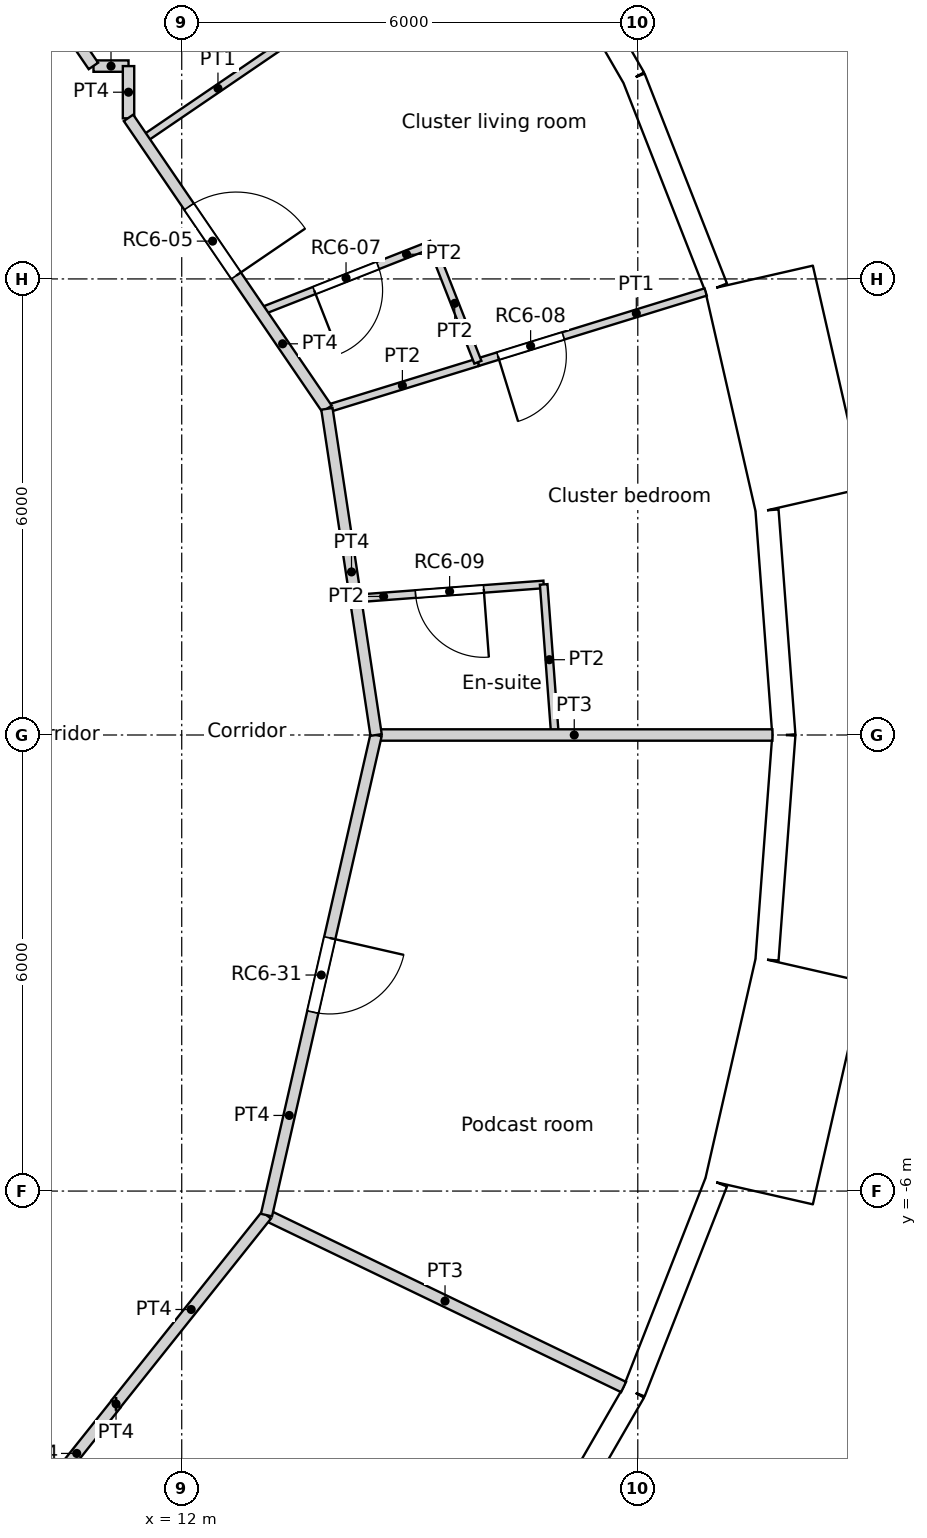
"""IFC4 building model, lengths in metres.
Left out: names, types, materials, properties, quantities, classifications, styles, units other than length and angle.
Written with IfcOpenShell. Run it as: python <this file> out.ifc"""

import sys

from ifc_helpers import new_model, si_unit, direction, frame, frame_2d, origin, origin_2d, place, context, subcontext, project, spatial, rectangle, circle, extrude, element, fill, save


model = new_model("IFC4")
c1 = context("Model", 3, precision=1e-05, world=origin(), true_north=direction((0.0, 1.0)))
c2 = subcontext(c1, "Body", "Model", "MODEL_VIEW")
j1 = project(units=[si_unit("LENGTHUNIT", "METRE"), si_unit("PLANEANGLEUNIT", "RADIAN")], contexts=[c1])
p1 = place(None, origin())
s1 = spatial("IfcSite", under=j1, at=p1, CompositionType="ELEMENT")
p2 = place(p1, origin())
s2 = spatial("IfcBuilding", under=s1, at=p2, CompositionType="ELEMENT")
p3 = place(p2, frame((0.0, 0.0, 283.8)))
s3 = spatial("IfcBuildingStorey", under=s2, at=p3, CompositionType="ELEMENT", Elevation=283.8)
for number, where, z_axis, x_axis in (
    (1, (18.822, 0.0, 0.0), (0.0, 0.0, 1.0), (1.0, 0.0, 0.0)),
    (2, (17.986, 5.548, 0.0), (0.0, 0.0, 1.0), (1.0, 0.0, 0.0)),
    (3, (17.986, -5.548, 0.0), (0.0, 0.0, 1.0), (1.0, 0.0, 0.0)),
):
    element("IfcColumn", number, at=place(p3, frame(where, z_axis=z_axis, x_axis=x_axis)), inside=s3, PredefinedType="COLUMN", context=c2, shape_type="SweptSolid", body=[
        extrude(circle(Radius=0.45, at=origin_2d()), origin(), (0.0, 0.0, 1.0), 3.6),
    ])
p4 = place(p3, frame((19.922, 0.0, 0.0), z_axis=(0.0, 0.0, 1.0), x_axis=(-0.074755115547, 0.997201921729, 0.0)))
e4 = element("IfcWall", 4, at=p4, inside=s3, PredefinedType="SOLIDWALL", context=c2, shape_type="SweptSolid", body=[
    extrude(rectangle(XDim=2.962, YDim=0.3, at=frame_2d((1.481, 0.0))), origin(), (0.0, 0.0, 1.0), 3.25),
])
p5 = place(p4, frame((1.481, 0.0, 1.55)))
e5 = element("IfcOpeningElement", 5, at=p5, cuts=e4, PredefinedType="OPENING", context=c2, shape_type="SweptSolid", body=[
    extrude(circle(Radius=0.9, at=origin_2d()), frame((0.0, 0.16, 0.0), z_axis=(0.0, -1.0, 0.0), x_axis=(1.0, 0.0, 0.0)), (0.0, 0.0, 1.0), 0.32),
])
p6 = place(p3, frame((20.262, 3.086, -0.35), z_axis=(0.0, 0.0, 1.0), x_axis=(-0.222570682856, 0.974916555985, 0.0)))
e6 = element("IfcWall", 6, at=p6, inside=s3, PredefinedType="ELEMENTEDWALL", context=c2, shape_type="SweptSolid", body=[
    extrude(rectangle(XDim=3.0, YDim=1.45, at=frame_2d((1.5, 0.0))), origin(), (0.0, 0.0, 1.0), 3.6),
])
p7 = place(p6, frame((1.5, 0.0, 1.9)))
e7 = element("IfcOpeningElement", 7, at=p7, cuts=e6, PredefinedType="OPENING", context=c2, shape_type="SweptSolid", body=[
    extrude(circle(Radius=0.9, at=origin_2d()), frame((0.0, 0.735, 0.0), z_axis=(0.0, -1.0, 0.0), x_axis=(1.0, 0.0, 0.0)), (0.0, 0.0, 1.0), 1.47),
])
p8 = place(p3, frame((19.031, 5.886, 0.0), z_axis=(0.0, 0.0, 1.0), x_axis=(-0.365343821297, 0.930872650925, 0.0)))
e8 = element("IfcWall", 8, at=p8, inside=s3, PredefinedType="SOLIDWALL", context=c2, shape_type="SweptSolid", body=[
    extrude(rectangle(XDim=2.962, YDim=0.3, at=frame_2d((1.481, 0.0))), origin(), (0.0, 0.0, 1.0), 3.25),
])
p9 = place(p8, frame((1.481, 0.0, 1.55)))
e9 = element("IfcOpeningElement", 9, at=p9, cuts=e8, PredefinedType="OPENING", context=c2, shape_type="SweptSolid", body=[
    extrude(circle(Radius=0.9, at=origin_2d()), frame((0.0, 0.16, 0.0), z_axis=(0.0, -1.0, 0.0), x_axis=(1.0, 0.0, 0.0)), (0.0, 0.0, 1.0), 0.32),
])
p10 = place(p3, frame((17.949, 8.644, 0.0), z_axis=(0.0, 0.0, 1.0), x_axis=(-0.500012570604, 0.866018146021, 0.0)))
e10 = element("IfcWall", 10, at=p10, inside=s3, PredefinedType="SOLIDWALL", context=c2, shape_type="SweptSolid", body=[
    extrude(rectangle(XDim=2.962, YDim=0.3, at=frame_2d((1.481, 0.0))), origin(), (0.0, 0.0, 1.0), 3.25),
])
p11 = place(p10, frame((1.481, 0.0, 1.55)))
e11 = element("IfcOpeningElement", 11, at=p11, cuts=e10, PredefinedType="OPENING", context=c2, shape_type="SweptSolid", body=[
    extrude(circle(Radius=0.9, at=origin_2d()), frame((0.0, 0.16, 0.0), z_axis=(0.0, -1.0, 0.0), x_axis=(1.0, 0.0, 0.0)), (0.0, 0.0, 1.0), 0.32),
])
p12 = place(p3, frame((16.468, -11.209, 0.0), z_axis=(0.0, 0.0, 1.0), x_axis=(0.500012570604, 0.866018146021, 0.0)))
e12 = element("IfcWall", 12, at=p12, inside=s3, PredefinedType="SOLIDWALL", context=c2, shape_type="SweptSolid", body=[
    extrude(rectangle(XDim=2.962, YDim=0.3, at=frame_2d((1.481, 0.0))), origin(), (0.0, 0.0, 1.0), 3.25),
])
p13 = place(p12, frame((1.481, 0.0, 1.55)))
e13 = element("IfcOpeningElement", 13, at=p13, cuts=e12, PredefinedType="OPENING", context=c2, shape_type="SweptSolid", body=[
    extrude(circle(Radius=0.9, at=origin_2d()), frame((0.0, 0.16, 0.0), z_axis=(0.0, -1.0, 0.0), x_axis=(1.0, 0.0, 0.0)), (0.0, 0.0, 1.0), 0.32),
])
p14 = place(p3, frame((17.949, -8.644, 0.0), z_axis=(0.0, 0.0, 1.0), x_axis=(0.365343821297, 0.930872650925, 0.0)))
e14 = element("IfcWall", 14, at=p14, inside=s3, PredefinedType="SOLIDWALL", context=c2, shape_type="SweptSolid", body=[
    extrude(rectangle(XDim=2.962, YDim=0.3, at=frame_2d((1.481, 0.0))), origin(), (0.0, 0.0, 1.0), 3.25),
])
p15 = place(p14, frame((1.481, 0.0, 1.55)))
e15 = element("IfcOpeningElement", 15, at=p15, cuts=e14, PredefinedType="OPENING", context=c2, shape_type="SweptSolid", body=[
    extrude(circle(Radius=0.9, at=origin_2d()), frame((0.0, 0.16, 0.0), z_axis=(0.0, -1.0, 0.0), x_axis=(1.0, 0.0, 0.0)), (0.0, 0.0, 1.0), 0.32),
])
p16 = place(p3, frame((19.595, -6.011, -0.35), z_axis=(0.0, 0.0, 1.0), x_axis=(0.222570682856, 0.974916555985, 0.0)))
e16 = element("IfcWall", 16, at=p16, inside=s3, PredefinedType="ELEMENTEDWALL", context=c2, shape_type="SweptSolid", body=[
    extrude(rectangle(XDim=3.0, YDim=1.45, at=frame_2d((1.5, 0.0))), origin(), (0.0, 0.0, 1.0), 3.6),
])
p17 = place(p16, frame((1.5, 0.0, 1.9)))
e17 = element("IfcOpeningElement", 17, at=p17, cuts=e16, PredefinedType="OPENING", context=c2, shape_type="SweptSolid", body=[
    extrude(circle(Radius=0.9, at=origin_2d()), frame((0.0, 0.735, 0.0), z_axis=(0.0, -1.0, 0.0), x_axis=(1.0, 0.0, 0.0)), (0.0, 0.0, 1.0), 1.47),
])
p18 = place(p3, frame((19.7, -2.954, 0.0), z_axis=(0.0, 0.0, 1.0), x_axis=(0.074755115547, 0.997201921729, 0.0)))
e18 = element("IfcWall", 18, at=p18, inside=s3, PredefinedType="SOLIDWALL", context=c2, shape_type="SweptSolid", body=[
    extrude(rectangle(XDim=2.962, YDim=0.3, at=frame_2d((1.481, 0.0))), origin(), (0.0, 0.0, 1.0), 3.25),
])
p19 = place(p18, frame((1.481, 0.0, 1.55)))
e19 = element("IfcOpeningElement", 19, at=p19, cuts=e18, PredefinedType="OPENING", context=c2, shape_type="SweptSolid", body=[
    extrude(circle(Radius=0.9, at=origin_2d()), frame((0.0, 0.16, 0.0), z_axis=(0.0, -1.0, 0.0), x_axis=(1.0, 0.0, 0.0)), (0.0, 0.0, 1.0), 0.32),
])
p20 = place(p3, frame((9.075, 11.381, 0.0), z_axis=(0.0, 0.0, 1.0), x_axis=(0.564277533473, -0.825585165333, 0.0)))
e20 = element("IfcWall", 20, at=p20, inside=s3, PredefinedType="PARTITIONING", context=c2, shape_type="SweptSolid", body=[
    extrude(rectangle(XDim=3.123, YDim=0.15, at=frame_2d((1.562, 0.0))), origin(), (0.0, 0.0, 1.0), 3.25),
])
p21 = place(p3, frame((10.839, 8.8, 0.0), z_axis=(0.0, 0.0, 1.0), x_axis=(1.0, 0.0, 0.0)))
e21 = element("IfcWall", 21, at=p21, inside=s3, PredefinedType="PARTITIONING", context=c2, shape_type="SweptSolid", body=[
    extrude(rectangle(XDim=0.461, YDim=0.15, at=frame_2d((0.23, 0.0))), origin(), (0.0, 0.0, 1.0), 3.25),
])
p22 = place(p3, frame((11.3, 8.113, 0.0), z_axis=(0.0, 0.0, 1.0), x_axis=(0.0, 1.0, 0.0)))
e22 = element("IfcWall", 22, at=p22, inside=s3, PredefinedType="PARTITIONING", context=c2, shape_type="SweptSolid", body=[
    extrude(rectangle(XDim=0.687, YDim=0.15, at=frame_2d((0.344, 0.0))), origin(), (0.0, 0.0, 1.0), 3.25),
])
p23 = place(p3, frame((11.137, -8.8, 0.0), z_axis=(0.0, 0.0, 1.0), x_axis=(-1.0, 0.0, 0.0)))
e23 = element("IfcWall", 23, at=p23, inside=s3, PredefinedType="PARTITIONING", context=c2, shape_type="SweptSolid", body=[
    extrude(rectangle(XDim=0.003, YDim=0.15, at=frame_2d((0.001, 0.0))), origin(), (0.0, 0.0, 1.0), 3.25),
])
p24 = place(p3, frame((10.101, -10.101, 0.0), z_axis=(0.0, 0.0, 1.0), x_axis=(0.623098344652, 0.782143498913, 0.0)))
e24 = element("IfcWall", 24, at=p24, inside=s3, PredefinedType="PARTITIONING", context=c2, shape_type="SweptSolid", body=[
    extrude(rectangle(XDim=1.661, YDim=0.15, at=frame_2d((0.831, 0.0))), origin(), (0.0, 0.0, 1.0), 3.25),
])
p25 = place(p3, frame((11.3, 8.119, 0.0), z_axis=(0.0, 0.0, 1.0), x_axis=(0.56348561488, -0.82612587529, 0.0)))
e25 = element("IfcWall", 25, at=p25, inside=s3, PredefinedType="PARTITIONING", context=c2, shape_type="SweptSolid", body=[
    extrude(rectangle(XDim=4.633, YDim=0.15, at=frame_2d((2.316, 0.0))), origin(), (0.0, 0.0, 1.0), 3.25),
])
p26 = place(p25, frame((1.413, 0.0, 0.0)))
e26 = element("IfcOpeningElement", 26, at=p26, cuts=e25, PredefinedType="OPENING", context=c2, shape_type="SweptSolid", body=[
    extrude(rectangle(XDim=1.1, YDim=2.1, at=frame_2d((0.55, 1.05))), frame((0.0, 0.075, 0.0), z_axis=(0.0, -1.0, 0.0), x_axis=(1.0, 0.0, 0.0)), (0.0, 0.0, 1.0), 0.15),
])
p27 = place(p3, frame((13.91, 4.291, 0.0), z_axis=(0.0, 0.0, 1.0), x_axis=(0.149143716951, -0.988815529659, 0.0)))
e27 = element("IfcWall", 27, at=p27, inside=s3, PredefinedType="PARTITIONING", context=c2, shape_type="SweptSolid", body=[
    extrude(rectangle(XDim=4.34, YDim=0.15, at=frame_2d((2.17, 0.0))), origin(), (0.0, 0.0, 1.0), 3.25),
])
p28 = place(p3, frame((11.134, -8.8, 0.0), z_axis=(0.0, 0.0, 1.0), x_axis=(0.623476099415, 0.781842409606, 0.0)))
e28 = element("IfcWall", 28, at=p28, inside=s3, PredefinedType="PARTITIONING", context=c2, shape_type="SweptSolid", body=[
    extrude(rectangle(XDim=3.177, YDim=0.15, at=frame_2d((1.589, 0.0))), origin(), (0.0, 0.0, 1.0), 3.25),
])
p29 = place(p3, frame((13.115, -6.316, 0.0), z_axis=(0.0, 0.0, 1.0), x_axis=(0.222568978642, 0.97491694505, 0.0)))
e29 = element("IfcWall", 29, at=p29, inside=s3, PredefinedType="PARTITIONING", context=c2, shape_type="SweptSolid", body=[
    extrude(rectangle(XDim=6.479, YDim=0.15, at=frame_2d((3.239, 0.0))), origin(), (0.0, 0.0, 1.0), 3.25),
])
p30 = place(p29, frame((2.74, 0.0, 0.0)))
e30 = element("IfcOpeningElement", 30, at=p30, cuts=e29, PredefinedType="OPENING", context=c2, shape_type="SweptSolid", body=[
    extrude(rectangle(XDim=1.0, YDim=2.04, at=frame_2d((0.5, 1.02))), frame((0.0, 0.075, 0.0), z_axis=(0.0, -1.0, 0.0), x_axis=(1.0, 0.0, 0.0)), (0.0, 0.0, 1.0), 0.15),
])
p31 = place(p3, frame((11.493, 7.836, 0.0), z_axis=(0.0, 0.0, 1.0), x_axis=(0.826231748746, 0.563330362544, 0.0)))
e31 = element("IfcWall", 31, at=p31, inside=s3, PredefinedType="PARTITIONING", context=c2, shape_type="SweptSolid", body=[
    extrude(rectangle(XDim=5.862, YDim=0.1, at=frame_2d((2.931, 0.0))), origin(), (0.0, 0.0, 1.0), 3.25),
])
p32 = place(p31, frame((2.431, 0.0, 0.0)))
e32 = element("IfcOpeningElement", 32, at=p32, cuts=e31, PredefinedType="OPENING", context=c2, shape_type="SweptSolid", body=[
    extrude(rectangle(XDim=1.0, YDim=2.04, at=frame_2d((0.5, 1.02))), frame((0.0, 0.05, 0.0), z_axis=(0.0, -1.0, 0.0), x_axis=(1.0, 0.0, 0.0)), (0.0, 0.0, 1.0), 0.1),
])
p33 = place(p3, frame((15.287, 6.454, 0.0), z_axis=(0.0, 0.0, 1.0), x_axis=(0.365620622357, -0.930763966056, 0.0)))
e33 = element("IfcWall", 33, at=p33, inside=s3, PredefinedType="PARTITIONING", context=c2, shape_type="SweptSolid", body=[
    extrude(rectangle(XDim=1.665, YDim=0.1, at=frame_2d((0.833, 0.0))), origin(), (0.0, 0.0, 1.0), 3.25),
])
p34 = place(p3, frame((13.037, 5.571, 0.0), z_axis=(0.0, 0.0, 1.0), x_axis=(0.930874211086, 0.365339846083, 0.0)))
e34 = element("IfcWall", 34, at=p34, inside=s3, PredefinedType="PARTITIONING", context=c2, shape_type="SweptSolid", body=[
    extrude(rectangle(XDim=2.417, YDim=0.1, at=frame_2d((1.208, 0.0))), origin(), (0.0, 0.0, 1.0), 3.25),
])
p35 = place(p34, frame((0.758, 0.0, 0.0)))
e35 = element("IfcOpeningElement", 35, at=p35, cuts=e34, PredefinedType="OPENING", context=c2, shape_type="SweptSolid", body=[
    extrude(rectangle(XDim=0.9, YDim=2.0, at=frame_2d((0.45, 1.0))), frame((0.0, 0.05, 0.0), z_axis=(0.0, -1.0, 0.0), x_axis=(1.0, 0.0, 0.0)), (0.0, 0.0, 1.0), 0.1),
])
p36 = place(p3, frame((15.896, 4.904, 0.0), z_axis=(0.0, 0.0, 1.0), x_axis=(0.955630770746, 0.294567190983, 0.0)))
e36 = element("IfcWall", 36, at=p36, inside=s3, PredefinedType="PARTITIONING", context=c2, shape_type="SweptSolid", body=[
    extrude(rectangle(XDim=3.136, YDim=0.1, at=frame_2d((1.568, 0.0))), origin(), (0.0, 0.0, 1.0), 3.25),
])
p37 = place(p36, frame((0.276, 0.0, 0.0)))
e37 = element("IfcOpeningElement", 37, at=p37, cuts=e36, PredefinedType="OPENING", context=c2, shape_type="SweptSolid", body=[
    extrude(rectangle(XDim=0.9, YDim=2.1, at=frame_2d((0.45, 1.05))), frame((0.0, 0.05, 0.0), z_axis=(0.0, -1.0, 0.0), x_axis=(1.0, 0.0, 0.0)), (0.0, 0.0, 1.0), 0.1),
])
p38 = place(p3, frame((13.91, 4.291, 0.0), z_axis=(0.0, 0.0, 1.0), x_axis=(0.955649377322, 0.294506821014, 0.0)))
e38 = element("IfcWall", 38, at=p38, inside=s3, PredefinedType="PARTITIONING", context=c2, shape_type="SweptSolid", body=[
    extrude(rectangle(XDim=2.078, YDim=0.1, at=frame_2d((1.039, 0.0))), origin(), (0.0, 0.0, 1.0), 3.25),
])
p39 = place(p3, frame((16.762, 1.981, 0.0), z_axis=(0.0, 0.0, 1.0), x_axis=(0.074478298815, -0.997222634624, 0.0)))
e39 = element("IfcWall", 39, at=p39, inside=s3, PredefinedType="PARTITIONING", context=c2, shape_type="SweptSolid", body=[
    extrude(rectangle(XDim=1.987, YDim=0.1, at=frame_2d((0.993, 0.0))), origin(), (0.0, 0.0, 1.0), 3.25),
])
p40 = place(p3, frame((14.286, 1.795, 0.0), z_axis=(0.0, 0.0, 1.0), x_axis=(0.997189401658, 0.074921940846, 0.0)))
e40 = element("IfcWall", 40, at=p40, inside=s3, PredefinedType="PARTITIONING", context=c2, shape_type="SweptSolid", body=[
    extrude(rectangle(XDim=2.483, YDim=0.1, at=frame_2d((1.242, 0.0))), origin(), (0.0, 0.0, 1.0), 3.25),
])
p41 = place(p40, frame((0.792, 0.0, 0.0)))
e41 = element("IfcOpeningElement", 41, at=p41, cuts=e40, PredefinedType="OPENING", context=c2, shape_type="SweptSolid", body=[
    extrude(rectangle(XDim=0.9, YDim=2.04, at=frame_2d((0.45, 1.02))), frame((0.0, 0.05, 0.0), z_axis=(0.0, -1.0, 0.0), x_axis=(1.0, 0.0, 0.0)), (0.0, 0.0, 1.0), 0.1),
])
for number, where, z_axis, x_axis in (
    (42, (14.557, 0.0, 0.0), (0.0, 0.0, 1.0), (1.0, 0.0, 0.0)),
    (43, (13.115, -6.316, 0.0), (0.0, 0.0, 1.0), (0.901, -0.434, 0.0)),
):
    element("IfcWall", number, at=place(p3, frame(where, z_axis=z_axis, x_axis=x_axis)), inside=s3, PredefinedType="PARTITIONING", context=c2, shape_type="SweptSolid", body=[
        extrude(rectangle(XDim=5.214, YDim=0.15, at=frame_2d((2.607, 0.0))), origin(), (0.0, 0.0, 1.0), 3.25),
    ])
p42 = place(p5, origin())
e44 = element("IfcWindow", 44, at=p42, inside=s3, PartitioningType="SINGLE_PANEL", PredefinedType="WINDOW", context=c2, shape_type="SweptSolid", body=[
    extrude(circle(Radius=0.9, at=origin_2d()), frame((0.0, 0.12, 0.0), z_axis=(0.0, -1.0, 0.0), x_axis=(1.0, 0.0, 0.0)), (0.0, 0.0, 1.0), 0.1),
])
fill(e5, e44)
p43 = place(p7, origin())
e45 = element("IfcWindow", 45, at=p43, inside=s3, PartitioningType="SINGLE_PANEL", PredefinedType="WINDOW", context=c2, shape_type="SweptSolid", body=[
    extrude(circle(Radius=0.9, at=origin_2d()), frame((0.0, 0.695, 0.0), z_axis=(0.0, -1.0, 0.0), x_axis=(1.0, 0.0, 0.0)), (0.0, 0.0, 1.0), 0.1),
])
fill(e7, e45)
p44 = place(p9, origin())
e46 = element("IfcWindow", 46, at=p44, inside=s3, PartitioningType="SINGLE_PANEL", PredefinedType="WINDOW", context=c2, shape_type="SweptSolid", body=[
    extrude(circle(Radius=0.9, at=origin_2d()), frame((0.0, 0.12, 0.0), z_axis=(0.0, -1.0, 0.0), x_axis=(1.0, 0.0, 0.0)), (0.0, 0.0, 1.0), 0.1),
])
fill(e9, e46)
p45 = place(p13, origin())
e47 = element("IfcWindow", 47, at=p45, inside=s3, PartitioningType="SINGLE_PANEL", PredefinedType="WINDOW", context=c2, shape_type="SweptSolid", body=[
    extrude(circle(Radius=0.9, at=origin_2d()), frame((0.0, 0.12, 0.0), z_axis=(0.0, -1.0, 0.0), x_axis=(1.0, 0.0, 0.0)), (0.0, 0.0, 1.0), 0.1),
])
fill(e13, e47)
p46 = place(p15, origin())
e48 = element("IfcWindow", 48, at=p46, inside=s3, PartitioningType="SINGLE_PANEL", PredefinedType="WINDOW", context=c2, shape_type="SweptSolid", body=[
    extrude(circle(Radius=0.9, at=origin_2d()), frame((0.0, 0.12, 0.0), z_axis=(0.0, -1.0, 0.0), x_axis=(1.0, 0.0, 0.0)), (0.0, 0.0, 1.0), 0.1),
])
fill(e15, e48)
p47 = place(p17, origin())
e49 = element("IfcWindow", 49, at=p47, inside=s3, PartitioningType="SINGLE_PANEL", PredefinedType="WINDOW", context=c2, shape_type="SweptSolid", body=[
    extrude(circle(Radius=0.9, at=origin_2d()), frame((0.0, 0.695, 0.0), z_axis=(0.0, -1.0, 0.0), x_axis=(1.0, 0.0, 0.0)), (0.0, 0.0, 1.0), 0.1),
])
fill(e17, e49)
p48 = place(p19, origin())
e50 = element("IfcWindow", 50, at=p48, inside=s3, PartitioningType="SINGLE_PANEL", PredefinedType="WINDOW", context=c2, shape_type="SweptSolid", body=[
    extrude(circle(Radius=0.9, at=origin_2d()), frame((0.0, 0.12, 0.0), z_axis=(0.0, -1.0, 0.0), x_axis=(1.0, 0.0, 0.0)), (0.0, 0.0, 1.0), 0.1),
])
fill(e19, e50)
p49 = place(p26, origin())
e51 = element("IfcDoor", 51, at=p49, inside=s3, OperationType="SINGLE_SWING_RIGHT", PredefinedType="DOOR", context=c2, shape_type="SweptSolid", body=[
    extrude(rectangle(XDim=1.1, YDim=2.1, at=frame_2d((0.55, 1.05))), frame((0.0, 0.025, 0.0), z_axis=(0.0, -1.0, 0.0), x_axis=(1.0, 0.0, 0.0)), (0.0, 0.0, 1.0), 0.05),
])
fill(e26, e51)
p50 = place(p35, origin())
e52 = element("IfcDoor", 52, at=p50, inside=s3, OperationType="SINGLE_SWING_RIGHT", PredefinedType="DOOR", context=c2, shape_type="SweptSolid", body=[
    extrude(rectangle(XDim=0.9, YDim=2.0, at=frame_2d((0.45, 1.0))), frame((0.0, 0.025, 0.0), z_axis=(0.0, -1.0, 0.0), x_axis=(1.0, 0.0, 0.0)), (0.0, 0.0, 1.0), 0.05),
])
fill(e35, e52)
p51 = place(p37, origin())
e53 = element("IfcDoor", 53, at=p51, inside=s3, OperationType="SINGLE_SWING_RIGHT", PredefinedType="DOOR", context=c2, shape_type="SweptSolid", body=[
    extrude(rectangle(XDim=0.9, YDim=2.1, at=frame_2d((0.45, 1.05))), frame((0.0, 0.025, 0.0), z_axis=(0.0, -1.0, 0.0), x_axis=(1.0, 0.0, 0.0)), (0.0, 0.0, 1.0), 0.05),
])
fill(e37, e53)
p52 = place(p41, origin())
e54 = element("IfcDoor", 54, at=p52, inside=s3, OperationType="SINGLE_SWING_LEFT", PredefinedType="DOOR", context=c2, shape_type="SweptSolid", body=[
    extrude(rectangle(XDim=0.9, YDim=2.04, at=frame_2d((0.45, 1.02))), frame((0.0, 0.025, 0.0), z_axis=(0.0, -1.0, 0.0), x_axis=(1.0, 0.0, 0.0)), (0.0, 0.0, 1.0), 0.05),
])
fill(e41, e54)
p53 = place(p30, origin())
e55 = element("IfcDoor", 55, at=p53, inside=s3, OperationType="SINGLE_SWING_LEFT", PredefinedType="DOOR", context=c2, shape_type="SweptSolid", body=[
    extrude(rectangle(XDim=1.0, YDim=2.04, at=frame_2d((0.5, 1.02))), frame((0.0, 0.025, 0.0), z_axis=(0.0, -1.0, 0.0), x_axis=(1.0, 0.0, 0.0)), (0.0, 0.0, 1.0), 0.05),
])
fill(e30, e55)
save(model, sys.argv[1])
